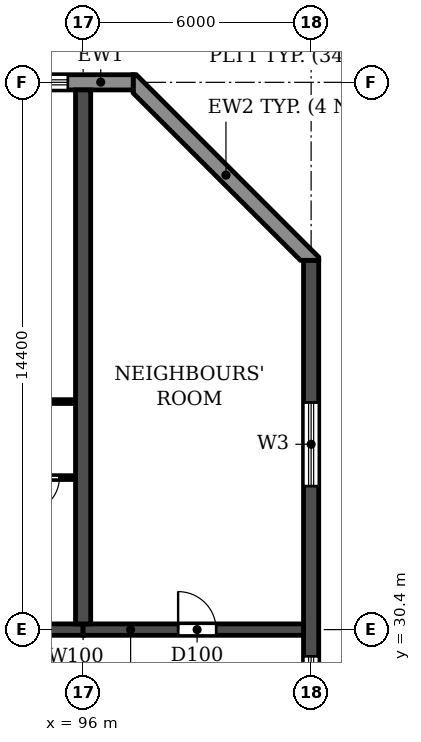
"""IFC4 building model, lengths in metres.
Left out: names, types, materials, properties, quantities, classifications, styles, units other than length and angle.
Written with IfcOpenShell. Run it as: python <this file> out.ifc"""

import sys

from ifc_helpers import new_model, si_unit, direction, frame, frame_2d, origin, place, context, subcontext, project, spatial, polyline, rectangle, outline, extrude, element, fill, save


model = new_model("IFC4")
c1 = context("Model", 3, precision=1e-05, world=origin(), true_north=direction((0.0, 1.0)))
c2 = subcontext(c1, "Body", "Model", "MODEL_VIEW")
j1 = project(units=[si_unit("LENGTHUNIT", "METRE"), si_unit("PLANEANGLEUNIT", "RADIAN")], contexts=[c1])
p1 = place(None, origin())
s1 = spatial("IfcSite", under=j1, at=p1, CompositionType="ELEMENT")
p2 = place(p1, origin())
s2 = spatial("IfcBuilding", under=s1, at=p2, CompositionType="ELEMENT")
p3 = place(p2, frame((0.0, 0.0, 23.4)))
s3 = spatial("IfcBuildingStorey", under=s2, at=p3, CompositionType="ELEMENT", Elevation=23.4)
p4 = place(p3, frame((96.0, 30.55, 0.0), z_axis=(0.0, 0.0, 1.0), x_axis=(0.0, 1.0, 0.0)))
e1 = element("IfcWall", 1, at=p4, inside=s3, PredefinedType="SHEAR", context=c2, shape_type="SweptSolid", body=[
    extrude(rectangle(XDim=14.05, YDim=0.4, at=frame_2d((7.025, 0.0))), origin(), (0.0, 0.0, 1.0), 3.05),
])
p5 = place(p3, frame((102.0, 4.683, 0.0), z_axis=(0.0, 0.0, 1.0), x_axis=(0.0, 1.0, 0.0)))
e2 = element("IfcWall", 2, at=p5, inside=s3, PredefinedType="SHEAR", context=c2, shape_type="SweptSolid", body=[
    extrude(rectangle(XDim=35.434, YDim=0.4, at=frame_2d((17.717, 0.0))), origin(), (0.0, 0.0, 1.0), 3.05),
])
p6 = place(p5, frame((15.917, 0.0, 0.9)))
e3 = element("IfcOpeningElement", 3, at=p6, cuts=e2, PredefinedType="OPENING", context=c2, shape_type="SweptSolid", body=[
    extrude(rectangle(XDim=1.2, YDim=1.5, at=frame_2d((0.6, 0.75))), frame((0.0, 0.21, 0.0), z_axis=(0.0, -1.0, 0.0), x_axis=(1.0, 0.0, 0.0)), (0.0, 0.0, 1.0), 0.42),
])
p7 = place(p5, frame((23.817, 0.0, 0.9)))
e4 = element("IfcOpeningElement", 4, at=p7, cuts=e2, PredefinedType="OPENING", context=c2, shape_type="SweptSolid", body=[
    extrude(rectangle(XDim=1.2, YDim=1.5, at=frame_2d((0.6, 0.75))), frame((0.0, 0.21, 0.0), z_axis=(0.0, -1.0, 0.0), x_axis=(1.0, 0.0, 0.0)), (0.0, 0.0, 1.0), 0.42),
])
p8 = place(p5, frame((8.017, 0.0, 0.9)))
e5 = element("IfcOpeningElement", 5, at=p8, cuts=e2, PredefinedType="OPENING", context=c2, shape_type="SweptSolid", body=[
    extrude(rectangle(XDim=1.2, YDim=1.5, at=frame_2d((0.6, 0.75))), frame((0.0, 0.21, 0.0), z_axis=(0.0, -1.0, 0.0), x_axis=(1.0, 0.0, 0.0)), (0.0, 0.0, 1.0), 0.42),
])
p9 = place(p5, frame((29.493, 0.0, 0.6)))
e6 = element("IfcOpeningElement", 6, at=p9, cuts=e2, PredefinedType="OPENING", context=c2, shape_type="SweptSolid", body=[
    extrude(rectangle(XDim=2.2, YDim=1.8, at=frame_2d((1.1, 0.9))), frame((0.0, 0.21, 0.0), z_axis=(0.0, -1.0, 0.0), x_axis=(1.0, 0.0, 0.0)), (0.0, 0.0, 1.0), 0.42),
])
p10 = place(p5, frame((2.541, 0.0, 0.6)))
e7 = element("IfcOpeningElement", 7, at=p10, cuts=e2, PredefinedType="OPENING", context=c2, shape_type="SweptSolid", body=[
    extrude(rectangle(XDim=2.2, YDim=1.8, at=frame_2d((1.1, 0.9))), frame((0.0, 0.21, 0.0), z_axis=(0.0, -1.0, 0.0), x_axis=(1.0, 0.0, 0.0)), (0.0, 0.0, 1.0), 0.42),
])
p11 = place(p3, frame((90.0, 30.4, 0.0), z_axis=(0.0, 0.0, 1.0), x_axis=(1.0, 0.0, 0.0)))
e8 = element("IfcWall", 8, at=p11, inside=s3, PredefinedType="SHEAR", context=c2, shape_type="SweptSolid", body=[
    extrude(rectangle(XDim=6.0, YDim=0.3, at=frame_2d((3.0, 0.0))), origin(), (0.0, 0.0, 1.0), 2.45),
])
p12 = place(p11, frame((2.45, 0.0, 0.0)))
e9 = element("IfcOpeningElement", 9, at=p12, cuts=e8, PredefinedType="OPENING", context=c2, shape_type="SweptSolid", body=[
    extrude(rectangle(XDim=1.0, YDim=2.1, at=frame_2d((0.5, 1.05))), frame((0.0, 0.16, 0.0), z_axis=(0.0, -1.0, 0.0), x_axis=(1.0, 0.0, 0.0)), (0.0, 0.0, 1.0), 0.32),
])
p13 = place(p3, frame((96.0, 30.4, 0.0), z_axis=(0.0, 0.0, 1.0), x_axis=(1.0, 0.0, 0.0)))
e10 = element("IfcWall", 10, at=p13, inside=s3, PredefinedType="SHEAR", context=c2, shape_type="SweptSolid", body=[
    extrude(rectangle(XDim=5.8, YDim=0.3, at=frame_2d((2.9, 0.0))), origin(), (0.0, 0.0, 1.0), 2.45),
])
p14 = place(p13, frame((2.5, 0.0, 0.0)))
e11 = element("IfcOpeningElement", 11, at=p14, cuts=e10, PredefinedType="OPENING", context=c2, shape_type="SweptSolid", body=[
    extrude(rectangle(XDim=1.0, YDim=2.1, at=frame_2d((0.5, 1.05))), frame((0.0, 0.16, 0.0), z_axis=(0.0, -1.0, 0.0), x_axis=(1.0, 0.0, 0.0)), (0.0, 0.0, 1.0), 0.32),
])
p15 = place(p3, origin())
e12 = element("IfcWall", 12, at=p15, inside=s3, PredefinedType="STANDARD", context=c2, shape_type="SweptSolid", body=[
    extrude(outline(polyline([(102.2, 40.117), (102.2, 40.2), (97.4, 45.0), (97.317, 45.0), (97.317, 44.517), (101.717, 40.117), (102.2, 40.117)])), origin(), (0.0, 0.0, 1.0), 3.05),
])
p16 = place(p3, frame((97.317, 44.8, 0.0), z_axis=(0.0, 0.0, 1.0), x_axis=(-1.0, 0.0, 0.0)))
e13 = element("IfcWall", 13, at=p16, inside=s3, PredefinedType="STANDARD", context=c2, shape_type="SweptSolid", body=[
    extrude(rectangle(XDim=92.634, YDim=0.4, at=frame_2d((46.317, 0.0))), origin(), (0.0, 0.0, 1.0), 3.05),
])
p17 = place(p16, frame((88.717, 0.0, 0.9)))
e14 = element("IfcOpeningElement", 14, at=p17, cuts=e13, PredefinedType="OPENING", context=c2, shape_type="SweptSolid", body=[
    extrude(rectangle(XDim=2.2, YDim=1.5, at=frame_2d((1.1, 0.75))), frame((0.0, 0.21, 0.0), z_axis=(0.0, -1.0, 0.0), x_axis=(1.0, 0.0, 0.0)), (0.0, 0.0, 1.0), 0.42),
])
p18 = place(p16, frame((85.917, 0.0, 0.0)))
e15 = element("IfcOpeningElement", 15, at=p18, cuts=e13, PredefinedType="OPENING", context=c2, shape_type="SweptSolid", body=[
    extrude(rectangle(XDim=1.8, YDim=2.4, at=frame_2d((0.9, 1.2))), frame((0.0, 0.21, 0.0), z_axis=(0.0, -1.0, 0.0), x_axis=(1.0, 0.0, 0.0)), (0.0, 0.0, 1.0), 0.42),
])
p19 = place(p16, frame((82.717, 0.0, 0.9)))
e16 = element("IfcOpeningElement", 16, at=p19, cuts=e13, PredefinedType="OPENING", context=c2, shape_type="SweptSolid", body=[
    extrude(rectangle(XDim=2.2, YDim=1.5, at=frame_2d((1.1, 0.75))), frame((0.0, 0.21, 0.0), z_axis=(0.0, -1.0, 0.0), x_axis=(1.0, 0.0, 0.0)), (0.0, 0.0, 1.0), 0.42),
])
p20 = place(p16, frame((79.717, 0.0, 0.9)))
e17 = element("IfcOpeningElement", 17, at=p20, cuts=e13, PredefinedType="OPENING", context=c2, shape_type="SweptSolid", body=[
    extrude(rectangle(XDim=2.2, YDim=1.5, at=frame_2d((1.1, 0.75))), frame((0.0, 0.21, 0.0), z_axis=(0.0, -1.0, 0.0), x_axis=(1.0, 0.0, 0.0)), (0.0, 0.0, 1.0), 0.42),
])
p21 = place(p16, frame((76.917, 0.0, 0.0)))
e18 = element("IfcOpeningElement", 18, at=p21, cuts=e13, PredefinedType="OPENING", context=c2, shape_type="SweptSolid", body=[
    extrude(rectangle(XDim=1.8, YDim=2.4, at=frame_2d((0.9, 1.2))), frame((0.0, 0.21, 0.0), z_axis=(0.0, -1.0, 0.0), x_axis=(1.0, 0.0, 0.0)), (0.0, 0.0, 1.0), 0.42),
])
p22 = place(p16, frame((73.717, 0.0, 0.9)))
e19 = element("IfcOpeningElement", 19, at=p22, cuts=e13, PredefinedType="OPENING", context=c2, shape_type="SweptSolid", body=[
    extrude(rectangle(XDim=2.2, YDim=1.5, at=frame_2d((1.1, 0.75))), frame((0.0, 0.21, 0.0), z_axis=(0.0, -1.0, 0.0), x_axis=(1.0, 0.0, 0.0)), (0.0, 0.0, 1.0), 0.42),
])
p23 = place(p16, frame((70.717, 0.0, 0.9)))
e20 = element("IfcOpeningElement", 20, at=p23, cuts=e13, PredefinedType="OPENING", context=c2, shape_type="SweptSolid", body=[
    extrude(rectangle(XDim=2.2, YDim=1.5, at=frame_2d((1.1, 0.75))), frame((0.0, 0.21, 0.0), z_axis=(0.0, -1.0, 0.0), x_axis=(1.0, 0.0, 0.0)), (0.0, 0.0, 1.0), 0.42),
])
p24 = place(p16, frame((67.717, 0.0, 0.9)))
e21 = element("IfcOpeningElement", 21, at=p24, cuts=e13, PredefinedType="OPENING", context=c2, shape_type="SweptSolid", body=[
    extrude(rectangle(XDim=2.2, YDim=1.5, at=frame_2d((1.1, 0.75))), frame((0.0, 0.21, 0.0), z_axis=(0.0, -1.0, 0.0), x_axis=(1.0, 0.0, 0.0)), (0.0, 0.0, 1.0), 0.42),
])
p25 = place(p16, frame((64.917, 0.0, 0.0)))
e22 = element("IfcOpeningElement", 22, at=p25, cuts=e13, PredefinedType="OPENING", context=c2, shape_type="SweptSolid", body=[
    extrude(rectangle(XDim=1.8, YDim=2.4, at=frame_2d((0.9, 1.2))), frame((0.0, 0.21, 0.0), z_axis=(0.0, -1.0, 0.0), x_axis=(1.0, 0.0, 0.0)), (0.0, 0.0, 1.0), 0.42),
])
p26 = place(p16, frame((61.717, 0.0, 0.9)))
e23 = element("IfcOpeningElement", 23, at=p26, cuts=e13, PredefinedType="OPENING", context=c2, shape_type="SweptSolid", body=[
    extrude(rectangle(XDim=2.2, YDim=1.5, at=frame_2d((1.1, 0.75))), frame((0.0, 0.21, 0.0), z_axis=(0.0, -1.0, 0.0), x_axis=(1.0, 0.0, 0.0)), (0.0, 0.0, 1.0), 0.42),
])
p27 = place(p16, frame((58.717, 0.0, 0.9)))
e24 = element("IfcOpeningElement", 24, at=p27, cuts=e13, PredefinedType="OPENING", context=c2, shape_type="SweptSolid", body=[
    extrude(rectangle(XDim=2.2, YDim=1.5, at=frame_2d((1.1, 0.75))), frame((0.0, 0.21, 0.0), z_axis=(0.0, -1.0, 0.0), x_axis=(1.0, 0.0, 0.0)), (0.0, 0.0, 1.0), 0.42),
])
p28 = place(p16, frame((55.917, 0.0, 0.0)))
e25 = element("IfcOpeningElement", 25, at=p28, cuts=e13, PredefinedType="OPENING", context=c2, shape_type="SweptSolid", body=[
    extrude(rectangle(XDim=1.8, YDim=2.4, at=frame_2d((0.9, 1.2))), frame((0.0, 0.21, 0.0), z_axis=(0.0, -1.0, 0.0), x_axis=(1.0, 0.0, 0.0)), (0.0, 0.0, 1.0), 0.42),
])
p29 = place(p16, frame((52.917, 0.0, 0.0)))
e26 = element("IfcOpeningElement", 26, at=p29, cuts=e13, PredefinedType="OPENING", context=c2, shape_type="SweptSolid", body=[
    extrude(rectangle(XDim=1.8, YDim=2.4, at=frame_2d((0.9, 1.2))), frame((0.0, 0.21, 0.0), z_axis=(0.0, -1.0, 0.0), x_axis=(1.0, 0.0, 0.0)), (0.0, 0.0, 1.0), 0.42),
])
p30 = place(p16, frame((49.717, 0.0, 0.9)))
e27 = element("IfcOpeningElement", 27, at=p30, cuts=e13, PredefinedType="OPENING", context=c2, shape_type="SweptSolid", body=[
    extrude(rectangle(XDim=2.2, YDim=1.5, at=frame_2d((1.1, 0.75))), frame((0.0, 0.21, 0.0), z_axis=(0.0, -1.0, 0.0), x_axis=(1.0, 0.0, 0.0)), (0.0, 0.0, 1.0), 0.42),
])
p31 = place(p16, frame((46.917, 0.0, 0.0)))
e28 = element("IfcOpeningElement", 28, at=p31, cuts=e13, PredefinedType="OPENING", context=c2, shape_type="SweptSolid", body=[
    extrude(rectangle(XDim=1.8, YDim=2.4, at=frame_2d((0.9, 1.2))), frame((0.0, 0.21, 0.0), z_axis=(0.0, -1.0, 0.0), x_axis=(1.0, 0.0, 0.0)), (0.0, 0.0, 1.0), 0.42),
])
p32 = place(p16, frame((43.717, 0.0, 0.9)))
e29 = element("IfcOpeningElement", 29, at=p32, cuts=e13, PredefinedType="OPENING", context=c2, shape_type="SweptSolid", body=[
    extrude(rectangle(XDim=2.2, YDim=1.5, at=frame_2d((1.1, 0.75))), frame((0.0, 0.21, 0.0), z_axis=(0.0, -1.0, 0.0), x_axis=(1.0, 0.0, 0.0)), (0.0, 0.0, 1.0), 0.42),
])
p33 = place(p16, frame((40.717, 0.0, 0.9)))
e30 = element("IfcOpeningElement", 30, at=p33, cuts=e13, PredefinedType="OPENING", context=c2, shape_type="SweptSolid", body=[
    extrude(rectangle(XDim=2.2, YDim=1.5, at=frame_2d((1.1, 0.75))), frame((0.0, 0.21, 0.0), z_axis=(0.0, -1.0, 0.0), x_axis=(1.0, 0.0, 0.0)), (0.0, 0.0, 1.0), 0.42),
])
p34 = place(p16, frame((37.917, 0.0, 0.0)))
e31 = element("IfcOpeningElement", 31, at=p34, cuts=e13, PredefinedType="OPENING", context=c2, shape_type="SweptSolid", body=[
    extrude(rectangle(XDim=1.8, YDim=2.4, at=frame_2d((0.9, 1.2))), frame((0.0, 0.21, 0.0), z_axis=(0.0, -1.0, 0.0), x_axis=(1.0, 0.0, 0.0)), (0.0, 0.0, 1.0), 0.42),
])
p35 = place(p16, frame((34.917, 0.0, 0.0)))
e32 = element("IfcOpeningElement", 32, at=p35, cuts=e13, PredefinedType="OPENING", context=c2, shape_type="SweptSolid", body=[
    extrude(rectangle(XDim=1.8, YDim=2.4, at=frame_2d((0.9, 1.2))), frame((0.0, 0.21, 0.0), z_axis=(0.0, -1.0, 0.0), x_axis=(1.0, 0.0, 0.0)), (0.0, 0.0, 1.0), 0.42),
])
p36 = place(p16, frame((31.717, 0.0, 0.9)))
e33 = element("IfcOpeningElement", 33, at=p36, cuts=e13, PredefinedType="OPENING", context=c2, shape_type="SweptSolid", body=[
    extrude(rectangle(XDim=2.2, YDim=1.5, at=frame_2d((1.1, 0.75))), frame((0.0, 0.21, 0.0), z_axis=(0.0, -1.0, 0.0), x_axis=(1.0, 0.0, 0.0)), (0.0, 0.0, 1.0), 0.42),
])
p37 = place(p16, frame((28.717, 0.0, 0.9)))
e34 = element("IfcOpeningElement", 34, at=p37, cuts=e13, PredefinedType="OPENING", context=c2, shape_type="SweptSolid", body=[
    extrude(rectangle(XDim=2.2, YDim=1.5, at=frame_2d((1.1, 0.75))), frame((0.0, 0.21, 0.0), z_axis=(0.0, -1.0, 0.0), x_axis=(1.0, 0.0, 0.0)), (0.0, 0.0, 1.0), 0.42),
])
p38 = place(p16, frame((25.717, 0.0, 0.9)))
e35 = element("IfcOpeningElement", 35, at=p38, cuts=e13, PredefinedType="OPENING", context=c2, shape_type="SweptSolid", body=[
    extrude(rectangle(XDim=2.2, YDim=1.5, at=frame_2d((1.1, 0.75))), frame((0.0, 0.21, 0.0), z_axis=(0.0, -1.0, 0.0), x_axis=(1.0, 0.0, 0.0)), (0.0, 0.0, 1.0), 0.42),
])
p39 = place(p16, frame((22.717, 0.0, 0.9)))
e36 = element("IfcOpeningElement", 36, at=p39, cuts=e13, PredefinedType="OPENING", context=c2, shape_type="SweptSolid", body=[
    extrude(rectangle(XDim=2.2, YDim=1.5, at=frame_2d((1.1, 0.75))), frame((0.0, 0.21, 0.0), z_axis=(0.0, -1.0, 0.0), x_axis=(1.0, 0.0, 0.0)), (0.0, 0.0, 1.0), 0.42),
])
p40 = place(p16, frame((19.917, 0.0, 0.0)))
e37 = element("IfcOpeningElement", 37, at=p40, cuts=e13, PredefinedType="OPENING", context=c2, shape_type="SweptSolid", body=[
    extrude(rectangle(XDim=1.8, YDim=2.4, at=frame_2d((0.9, 1.2))), frame((0.0, 0.21, 0.0), z_axis=(0.0, -1.0, 0.0), x_axis=(1.0, 0.0, 0.0)), (0.0, 0.0, 1.0), 0.42),
])
p41 = place(p16, frame((16.717, 0.0, 0.9)))
e38 = element("IfcOpeningElement", 38, at=p41, cuts=e13, PredefinedType="OPENING", context=c2, shape_type="SweptSolid", body=[
    extrude(rectangle(XDim=2.2, YDim=1.5, at=frame_2d((1.1, 0.75))), frame((0.0, 0.21, 0.0), z_axis=(0.0, -1.0, 0.0), x_axis=(1.0, 0.0, 0.0)), (0.0, 0.0, 1.0), 0.42),
])
p42 = place(p16, frame((13.717, 0.0, 0.9)))
e39 = element("IfcOpeningElement", 39, at=p42, cuts=e13, PredefinedType="OPENING", context=c2, shape_type="SweptSolid", body=[
    extrude(rectangle(XDim=2.2, YDim=1.5, at=frame_2d((1.1, 0.75))), frame((0.0, 0.21, 0.0), z_axis=(0.0, -1.0, 0.0), x_axis=(1.0, 0.0, 0.0)), (0.0, 0.0, 1.0), 0.42),
])
p43 = place(p16, frame((10.717, 0.0, 0.9)))
e40 = element("IfcOpeningElement", 40, at=p43, cuts=e13, PredefinedType="OPENING", context=c2, shape_type="SweptSolid", body=[
    extrude(rectangle(XDim=2.2, YDim=1.5, at=frame_2d((1.1, 0.75))), frame((0.0, 0.21, 0.0), z_axis=(0.0, -1.0, 0.0), x_axis=(1.0, 0.0, 0.0)), (0.0, 0.0, 1.0), 0.42),
])
p44 = place(p16, frame((7.917, 0.0, 0.0)))
e41 = element("IfcOpeningElement", 41, at=p44, cuts=e13, PredefinedType="OPENING", context=c2, shape_type="SweptSolid", body=[
    extrude(rectangle(XDim=1.8, YDim=2.4, at=frame_2d((0.9, 1.2))), frame((0.0, 0.21, 0.0), z_axis=(0.0, -1.0, 0.0), x_axis=(1.0, 0.0, 0.0)), (0.0, 0.0, 1.0), 0.42),
])
p45 = place(p16, frame((4.917, 0.0, 0.0)))
e42 = element("IfcOpeningElement", 42, at=p45, cuts=e13, PredefinedType="OPENING", context=c2, shape_type="SweptSolid", body=[
    extrude(rectangle(XDim=1.8, YDim=2.4, at=frame_2d((0.9, 1.2))), frame((0.0, 0.21, 0.0), z_axis=(0.0, -1.0, 0.0), x_axis=(1.0, 0.0, 0.0)), (0.0, 0.0, 1.0), 0.42),
])
p46 = place(p16, frame((1.717, 0.0, 0.9)))
e43 = element("IfcOpeningElement", 43, at=p46, cuts=e13, PredefinedType="OPENING", context=c2, shape_type="SweptSolid", body=[
    extrude(rectangle(XDim=2.2, YDim=1.5, at=frame_2d((1.1, 0.75))), frame((0.0, 0.21, 0.0), z_axis=(0.0, -1.0, 0.0), x_axis=(1.0, 0.0, 0.0)), (0.0, 0.0, 1.0), 0.42),
])
p47 = place(p3, frame((93.8, 34.4, 0.0), z_axis=(0.0, 0.0, 1.0), x_axis=(1.0, 0.0, 0.0)))
e44 = element("IfcWall", 44, at=p47, inside=s3, PredefinedType="PARTITIONING", context=c2, shape_type="SweptSolid", body=[
    extrude(rectangle(XDim=1.99, YDim=0.1, at=frame_2d((0.995, 0.0))), origin(), (0.0, 0.0, 1.0), 3.05),
])
p48 = place(p47, frame((0.675, 0.0, 0.0)))
e45 = element("IfcOpeningElement", 45, at=p48, cuts=e44, PredefinedType="OPENING", context=c2, shape_type="SweptSolid", body=[
    extrude(rectangle(XDim=0.9, YDim=2.1, at=frame_2d((0.45, 1.05))), frame((0.0, 0.06, 0.0), z_axis=(0.0, -1.0, 0.0), x_axis=(1.0, 0.0, 0.0)), (0.0, 0.0, 1.0), 0.12),
])
p49 = place(p3, frame((92.95, 36.4, 0.0), z_axis=(0.0, 0.0, 1.0), x_axis=(1.0, 0.0, 0.0)))
e46 = element("IfcWall", 46, at=p49, inside=s3, PredefinedType="PARTITIONING", context=c2, shape_type="SweptSolid", body=[
    extrude(rectangle(XDim=2.84, YDim=0.1, at=frame_2d((1.42, 0.0))), origin(), (0.0, 0.0, 1.0), 3.05),
])
p50 = place(p49, frame((0.55, 0.0, 0.0)))
e47 = element("IfcOpeningElement", 47, at=p50, cuts=e46, PredefinedType="OPENING", context=c2, shape_type="SweptSolid", body=[
    extrude(rectangle(XDim=0.9, YDim=2.1, at=frame_2d((0.45, 1.05))), frame((0.0, 0.06, 0.0), z_axis=(0.0, -1.0, 0.0), x_axis=(1.0, 0.0, 0.0)), (0.0, 0.0, 1.0), 0.12),
])
p51 = place(p7, origin())
e48 = element("IfcWindow", 48, at=p51, inside=s3, PartitioningType="SINGLE_PANEL", PredefinedType="WINDOW", context=c2, shape_type="SweptSolid", body=[
    extrude(rectangle(XDim=1.2, YDim=1.5, at=frame_2d((0.6, 0.75))), frame((0.0, 0.03, 0.0), z_axis=(0.0, -1.0, 0.0), x_axis=(1.0, 0.0, 0.0)), (0.0, 0.0, 1.0), 0.06),
])
fill(e4, e48)
p52 = place(p9, origin())
e49 = element("IfcWindow", 49, at=p52, inside=s3, PartitioningType="DOUBLE_PANEL_HORIZONTAL", PredefinedType="WINDOW", context=c2, shape_type="SweptSolid", body=[
    extrude(rectangle(XDim=2.2, YDim=1.8, at=frame_2d((1.1, 0.9))), frame((0.0, 0.03, 0.0), z_axis=(0.0, -1.0, 0.0), x_axis=(1.0, 0.0, 0.0)), (0.0, 0.0, 1.0), 0.06),
])
fill(e6, e49)
p53 = place(p46, origin())
e50 = element("IfcWindow", 50, at=p53, inside=s3, PartitioningType="DOUBLE_PANEL_HORIZONTAL", PredefinedType="WINDOW", context=c2, shape_type="SweptSolid", body=[
    extrude(rectangle(XDim=2.2, YDim=1.5, at=frame_2d((1.1, 0.75))), frame((0.0, 0.03, 0.0), z_axis=(0.0, -1.0, 0.0), x_axis=(1.0, 0.0, 0.0)), (0.0, 0.0, 1.0), 0.06),
])
fill(e43, e50)
p54 = place(p48, frame((0.9, 0.0, 0.0), z_axis=(0.0, 0.0, 1.0), x_axis=(-1.0, 0.0, 0.0)))
e51 = element("IfcDoor", 51, at=p54, inside=s3, OperationType="SINGLE_SWING_RIGHT", PredefinedType="DOOR", context=c2, shape_type="SweptSolid", body=[
    extrude(rectangle(XDim=0.9, YDim=2.1, at=frame_2d((0.45, 1.05))), frame((0.0, 0.025, 0.0), z_axis=(0.0, -1.0, 0.0), x_axis=(1.0, 0.0, 0.0)), (0.0, 0.0, 1.0), 0.05),
])
fill(e45, e51)
p55 = place(p14, origin())
e52 = element("IfcDoor", 52, at=p55, inside=s3, OperationType="SINGLE_SWING_LEFT", PredefinedType="DOOR", context=c2, shape_type="SweptSolid", body=[
    extrude(rectangle(XDim=1.0, YDim=2.1, at=frame_2d((0.5, 1.05))), frame((0.0, 0.025, 0.0), z_axis=(0.0, -1.0, 0.0), x_axis=(1.0, 0.0, 0.0)), (0.0, 0.0, 1.0), 0.05),
])
fill(e11, e52)
save(model, sys.argv[1])
